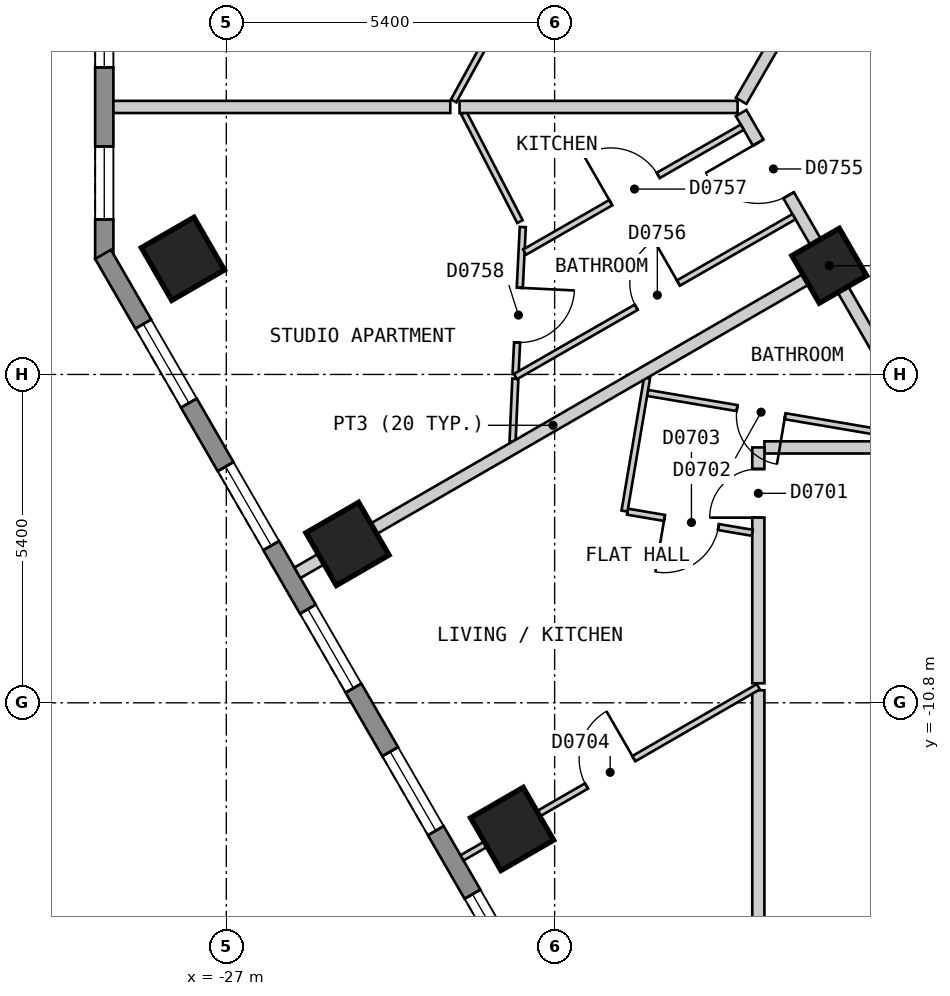
"""IFC4 building model, lengths in metres.
Left out: names, types, materials, properties, quantities, classifications, styles, units other than length and angle.
Written with IfcOpenShell. Run it as: python <this file> out.ifc"""

import sys

from ifc_helpers import new_model, si_unit, direction, frame, frame_2d, origin, origin_2d, place, context, subcontext, project, spatial, polyline, rectangle, outline, extrude, element, fill, save


model = new_model("IFC4")
c1 = context("Model", 3, precision=1e-05, world=origin(), true_north=direction((0.0, 1.0)))
c2 = subcontext(c1, "Body", "Model", "MODEL_VIEW")
j1 = project(units=[si_unit("LENGTHUNIT", "METRE"), si_unit("PLANEANGLEUNIT", "RADIAN")], contexts=[c1])
p1 = place(None, origin())
s1 = spatial("IfcSite", under=j1, at=p1, CompositionType="ELEMENT")
p2 = place(p1, origin())
s2 = spatial("IfcBuilding", under=s1, at=p2, CompositionType="ELEMENT")
p3 = place(p2, frame((0.0, 0.0, 105.0)))
s3 = spatial("IfcBuildingStorey", under=s2, at=p3, CompositionType="ELEMENT", Elevation=105.0)
for number, where, z_axis, x_axis in (
    (1, (-27.714, -3.499, 0.0), (0.0, 0.0, 1.0), (0.5, -0.866, 0.0)),
    (2, (-25.007, -8.187, 0.0), (0.0, 0.0, 1.0), (0.5, -0.866, 0.0)),
    (3, (-22.3, -12.875, 0.0), (0.0, 0.0, 1.0), (0.5, -0.866, 0.0)),
):
    element("IfcColumn", number, at=place(p3, frame(where, z_axis=z_axis, x_axis=x_axis)), inside=s3, PredefinedType="COLUMN", context=c2, shape_type="SweptSolid", body=[
        extrude(rectangle(XDim=1.0, YDim=1.0, at=origin_2d()), origin(), (0.0, 0.0, 1.0), 3.0),
    ])
p4 = place(p3, frame((-17.083, -3.612, 0.0), z_axis=(0.0, 0.0, 1.0), x_axis=(0.5, -0.866025403784, 0.0)))
e4 = element("IfcColumn", 4, at=p4, inside=s3, PredefinedType="COLUMN", context=c2, shape_type="SweptSolid", body=[
    extrude(rectangle(XDim=0.9, YDim=0.9, at=origin_2d()), origin(), (0.0, 0.0, 1.0), 3.0),
])
p5 = place(p3, frame((-29.007, 1.5, 0.0), z_axis=(0.0, 0.0, 1.0), x_axis=(0.0, -1.0, 0.0)))
e5 = element("IfcWall", 5, at=p5, inside=s3, PredefinedType="SOLIDWALL", context=c2, shape_type="SweptSolid", body=[
    extrude(outline(polyline([(0.0, -0.15), (5.0, -0.15), (4.92, 0.15), (0.08, 0.15), (0.0, -0.15)])), origin(), (0.0, 0.0, 1.0), 2.6),
])
p6 = place(p5, frame((0.65, 0.0, 0.15)))
e6 = element("IfcOpeningElement", 6, at=p6, cuts=e5, PredefinedType="OPENING", context=c2, shape_type="SweptSolid", body=[
    extrude(rectangle(XDim=1.2, YDim=2.1, at=frame_2d((0.6, 1.05))), frame((0.0, 0.16, 0.0), z_axis=(0.0, -1.0, 0.0), x_axis=(1.0, 0.0, 0.0)), (0.0, 0.0, 1.0), 0.32),
])
p7 = place(p5, frame((3.15, 0.0, 0.15)))
e7 = element("IfcOpeningElement", 7, at=p7, cuts=e5, PredefinedType="OPENING", context=c2, shape_type="SweptSolid", body=[
    extrude(rectangle(XDim=1.2, YDim=2.1, at=frame_2d((0.6, 1.05))), frame((0.0, 0.16, 0.0), z_axis=(0.0, -1.0, 0.0), x_axis=(1.0, 0.0, 0.0)), (0.0, 0.0, 1.0), 0.32),
])
p8 = place(p3, frame((-29.027, -3.425, 0.0), z_axis=(0.0, 0.0, 1.0), x_axis=(0.500035407905, -0.866004960056, 0.0)))
e8 = element("IfcWall", 8, at=p8, inside=s3, PredefinedType="SOLIDWALL", context=c2, shape_type="SweptSolid", body=[
    extrude(outline(polyline([(0.0, -0.15), (23.094, -0.15), (23.014, 0.15), (0.08, 0.15), (0.0, -0.15)])), origin(), (0.0, 0.0, 1.0), 2.6),
])
p9 = place(p8, frame((1.324, 0.0, 0.15)))
e9 = element("IfcOpeningElement", 9, at=p9, cuts=e8, PredefinedType="OPENING", context=c2, shape_type="SweptSolid", body=[
    extrude(rectangle(XDim=1.5, YDim=2.1, at=frame_2d((0.75, 1.05))), frame((0.0, 0.16, 0.0), z_axis=(0.0, -1.0, 0.0), x_axis=(1.0, 0.0, 0.0)), (0.0, 0.0, 1.0), 0.32),
])
p10 = place(p8, frame((4.031, 0.0, 0.15)))
e10 = element("IfcOpeningElement", 10, at=p10, cuts=e8, PredefinedType="OPENING", context=c2, shape_type="SweptSolid", body=[
    extrude(rectangle(XDim=1.5, YDim=2.1, at=frame_2d((0.75, 1.05))), frame((0.0, 0.16, 0.0), z_axis=(0.0, -1.0, 0.0), x_axis=(1.0, 0.0, 0.0)), (0.0, 0.0, 1.0), 0.32),
])
p11 = place(p8, frame((6.737, 0.0, 0.15)))
e11 = element("IfcOpeningElement", 11, at=p11, cuts=e8, PredefinedType="OPENING", context=c2, shape_type="SweptSolid", body=[
    extrude(rectangle(XDim=1.5, YDim=2.1, at=frame_2d((0.75, 1.05))), frame((0.0, 0.16, 0.0), z_axis=(0.0, -1.0, 0.0), x_axis=(1.0, 0.0, 0.0)), (0.0, 0.0, 1.0), 0.32),
])
p12 = place(p8, frame((9.444, 0.0, 0.15)))
e12 = element("IfcOpeningElement", 12, at=p12, cuts=e8, PredefinedType="OPENING", context=c2, shape_type="SweptSolid", body=[
    extrude(rectangle(XDim=1.5, YDim=2.1, at=frame_2d((0.75, 1.05))), frame((0.0, 0.16, 0.0), z_axis=(0.0, -1.0, 0.0), x_axis=(1.0, 0.0, 0.0)), (0.0, 0.0, 1.0), 0.32),
])
p13 = place(p8, frame((12.151, 0.0, 0.15)))
e13 = element("IfcOpeningElement", 13, at=p13, cuts=e8, PredefinedType="OPENING", context=c2, shape_type="SweptSolid", body=[
    extrude(rectangle(XDim=1.5, YDim=2.1, at=frame_2d((0.75, 1.05))), frame((0.0, 0.16, 0.0), z_axis=(0.0, -1.0, 0.0), x_axis=(1.0, 0.0, 0.0)), (0.0, 0.0, 1.0), 0.32),
])
p14 = place(p8, frame((14.857, 0.0, 0.15)))
e14 = element("IfcOpeningElement", 14, at=p14, cuts=e8, PredefinedType="OPENING", context=c2, shape_type="SweptSolid", body=[
    extrude(rectangle(XDim=1.5, YDim=2.1, at=frame_2d((0.75, 1.05))), frame((0.0, 0.16, 0.0), z_axis=(0.0, -1.0, 0.0), x_axis=(1.0, 0.0, 0.0)), (0.0, 0.0, 1.0), 0.32),
])
p15 = place(p8, frame((17.564, 0.0, 0.15)))
e15 = element("IfcOpeningElement", 15, at=p15, cuts=e8, PredefinedType="OPENING", context=c2, shape_type="SweptSolid", body=[
    extrude(rectangle(XDim=1.5, YDim=2.1, at=frame_2d((0.75, 1.05))), frame((0.0, 0.16, 0.0), z_axis=(0.0, -1.0, 0.0), x_axis=(1.0, 0.0, 0.0)), (0.0, 0.0, 1.0), 0.32),
])
p16 = place(p8, frame((20.27, 0.0, 0.15)))
e16 = element("IfcOpeningElement", 16, at=p16, cuts=e8, PredefinedType="OPENING", context=c2, shape_type="SweptSolid", body=[
    extrude(rectangle(XDim=1.5, YDim=2.1, at=frame_2d((0.75, 1.05))), frame((0.0, 0.16, 0.0), z_axis=(0.0, -1.0, 0.0), x_axis=(1.0, 0.0, 0.0)), (0.0, 0.0, 1.0), 0.32),
])
p17 = place(p3, frame((-18.533, -1.101, 0.0), z_axis=(0.0, 0.0, 1.0), x_axis=(0.500135180047, -0.865947343479, 0.0)))
e17 = element("IfcWall", 17, at=p17, inside=s3, PredefinedType="PARTITIONING", context=c2, shape_type="SweptSolid", body=[
    extrude(rectangle(XDim=2.799, YDim=0.2, at=frame_2d((1.399, 0.0))), origin(), (0.0, 0.0, 1.0), 2.6),
])
p18 = place(p17, frame((0.562, 0.0, 0.0)))
e18 = element("IfcOpeningElement", 18, at=p18, cuts=e17, PredefinedType="OPENING", context=c2, shape_type="SweptSolid", body=[
    extrude(rectangle(XDim=1.0, YDim=2.1, at=frame_2d((0.5, 1.05))), frame((0.0, 0.11, 0.0), z_axis=(0.0, -1.0, 0.0), x_axis=(1.0, 0.0, 0.0)), (0.0, 0.0, 1.0), 0.22),
])
p19 = place(p3, frame((-16.855, -4.008, 0.0), z_axis=(0.0, 0.0, 1.0), x_axis=(0.500151474942, -0.865937932021, 0.0)))
e19 = element("IfcWall", 19, at=p19, inside=s3, PredefinedType="PARTITIONING", context=c2, shape_type="SweptSolid", body=[
    extrude(rectangle(XDim=2.709, YDim=0.2, at=frame_2d((1.354, 0.0))), origin(), (0.0, 0.0, 1.0), 2.6),
])
p20 = place(p3, frame((-18.25, -10.594, 0.0), z_axis=(0.0, 0.0, 1.0), x_axis=(0.0, -1.0, 0.0)))
e20 = element("IfcWall", 20, at=p20, inside=s3, PredefinedType="PARTITIONING", context=c2, shape_type="SweptSolid", body=[
    extrude(rectangle(XDim=5.705, YDim=0.2, at=frame_2d((2.853, 0.0))), origin(), (0.0, 0.0, 1.0), 2.6),
])
p21 = place(p3, frame((-18.15, -6.6, 0.0), z_axis=(0.0, 0.0, 1.0), x_axis=(1.0, 0.0, 0.0)))
e21 = element("IfcWall", 21, at=p21, inside=s3, PredefinedType="PARTITIONING", context=c2, shape_type="SweptSolid", body=[
    extrude(rectangle(XDim=2.649, YDim=0.2, at=frame_2d((1.324, 0.0))), origin(), (0.0, 0.0, 1.0), 2.6),
])
p22 = place(p3, frame((-18.533, -0.901, 0.0), z_axis=(0.0, 0.0, 1.0), x_axis=(0.499981198768, 0.866036258409, 0.0)))
e22 = element("IfcWall", 22, at=p22, inside=s3, PredefinedType="PARTITIONING", context=c2, shape_type="SweptSolid", body=[
    extrude(rectangle(XDim=20.093, YDim=0.2, at=frame_2d((10.046, 0.0))), origin(), (0.0, 0.0, 1.0), 2.6),
])
p23 = place(p22, frame((14.57, 0.0, 0.0)))
e23 = element("IfcOpeningElement", 23, at=p23, cuts=e22, PredefinedType="OPENING", context=c2, shape_type="SweptSolid", body=[
    extrude(rectangle(XDim=1.0, YDim=2.1, at=frame_2d((0.5, 1.05))), frame((0.0, 0.11, 0.0), z_axis=(0.0, -1.0, 0.0), x_axis=(1.0, 0.0, 0.0)), (0.0, 0.0, 1.0), 0.22),
])
p24 = place(p22, frame((4.523, 0.0, 0.0)))
e24 = element("IfcOpeningElement", 24, at=p24, cuts=e22, PredefinedType="OPENING", context=c2, shape_type="SweptSolid", body=[
    extrude(rectangle(XDim=1.0, YDim=2.1, at=frame_2d((0.5, 1.05))), frame((0.0, 0.11, 0.0), z_axis=(0.0, -1.0, 0.0), x_axis=(1.0, 0.0, 0.0)), (0.0, 0.0, 1.0), 0.22),
])
p25 = place(p3, frame((-18.25, -10.479, 0.0), z_axis=(0.0, 0.0, 1.0), x_axis=(0.0, 1.0, 0.0)))
e25 = element("IfcWall", 25, at=p25, inside=s3, PredefinedType="PARTITIONING", context=c2, shape_type="SweptSolid", body=[
    extrude(rectangle(XDim=3.879, YDim=0.2, at=frame_2d((1.939, 0.0))), origin(), (0.0, 0.0, 1.0), 2.6),
])
p26 = place(p25, frame((2.724, 0.0, 0.0)))
e26 = element("IfcOpeningElement", 26, at=p26, cuts=e25, PredefinedType="OPENING", context=c2, shape_type="SweptSolid", body=[
    extrude(rectangle(XDim=0.8, YDim=2.1, at=frame_2d((0.4, 1.05))), frame((0.0, 0.11, 0.0), z_axis=(0.0, -1.0, 0.0), x_axis=(1.0, 0.0, 0.0)), (0.0, 0.0, 1.0), 0.22),
])
p27 = place(p3, frame((-23.093, -1.101, 0.0), z_axis=(0.0, 0.0, 1.0), x_axis=(0.459171814268, -0.888347479865, 0.0)))
e27 = element("IfcWall", 27, at=p27, inside=s3, PredefinedType="PARTITIONING", context=c2, shape_type="SweptSolid", body=[
    extrude(rectangle(XDim=2.01, YDim=0.1, at=frame_2d((1.005, 0.0))), origin(), (0.0, 0.0, 1.0), 2.6),
])
p28 = place(p3, frame((-20.071, -5.704, 0.0), z_axis=(0.0, 0.0, 1.0), x_axis=(0.985933263306, -0.16713946364, 0.0)))
e28 = element("IfcWall", 28, at=p28, inside=s3, PredefinedType="PARTITIONING", context=c2, shape_type="SweptSolid", body=[
    extrude(rectangle(XDim=4.636, YDim=0.1, at=frame_2d((2.318, 0.0))), origin(), (0.0, 0.0, 1.0), 2.6),
])
p29 = place(p28, frame((1.493, 0.0, 0.0)))
e29 = element("IfcOpeningElement", 29, at=p29, cuts=e28, PredefinedType="OPENING", context=c2, shape_type="SweptSolid", body=[
    extrude(rectangle(XDim=0.8, YDim=2.1, at=frame_2d((0.4, 1.05))), frame((0.0, 0.06, 0.0), z_axis=(0.0, -1.0, 0.0), x_axis=(1.0, 0.0, 0.0)), (0.0, 0.0, 1.0), 0.12),
])
p30 = place(p3, frame((-20.401, -7.657, 0.0), z_axis=(0.0, 0.0, 1.0), x_axis=(0.985991281902, -0.166796858522, 0.0)))
e30 = element("IfcWall", 30, at=p30, inside=s3, PredefinedType="PARTITIONING", context=c2, shape_type="SweptSolid", body=[
    extrude(rectangle(XDim=2.08, YDim=0.1, at=frame_2d((1.04, 0.0))), origin(), (0.0, 0.0, 1.0), 2.6),
])
p31 = place(p30, frame((0.616, 0.0, 0.0)))
e31 = element("IfcOpeningElement", 31, at=p31, cuts=e30, PredefinedType="OPENING", context=c2, shape_type="SweptSolid", body=[
    extrude(rectangle(XDim=0.9, YDim=2.1, at=frame_2d((0.45, 1.05))), frame((0.0, 0.06, 0.0), z_axis=(0.0, -1.0, 0.0), x_axis=(1.0, 0.0, 0.0)), (0.0, 0.0, 1.0), 0.12),
])
p32 = place(p3, frame((-23.261, -0.901, 0.0), z_axis=(0.0, 0.0, 1.0), x_axis=(0.481037050261, 0.876700265927, 0.0)))
e32 = element("IfcWall", 32, at=p32, inside=s3, PredefinedType="PARTITIONING", context=c2, shape_type="SweptSolid", body=[
    extrude(rectangle(XDim=4.827, YDim=0.1, at=frame_2d((2.414, 0.0))), origin(), (0.0, 0.0, 1.0), 2.6),
])
p33 = place(p3, frame((-20.451, -7.647, 0.0), z_axis=(0.0, 0.0, 1.0), x_axis=(0.167037570483, 0.985950531237, 0.0)))
e33 = element("IfcWall", 33, at=p33, inside=s3, PredefinedType="PARTITIONING", context=c2, shape_type="SweptSolid", body=[
    extrude(rectangle(XDim=2.22, YDim=0.1, at=frame_2d((1.11, 0.0))), origin(), (0.0, 0.0, 1.0), 2.6),
])
p34 = place(p3, frame((-22.243, -5.395, 0.0), z_axis=(0.0, 0.0, 1.0), x_axis=(0.049092933256, 0.998794214993, 0.0)))
e34 = element("IfcWall", 34, at=p34, inside=s3, PredefinedType="PARTITIONING", context=c2, shape_type="SweptSolid", body=[
    extrude(rectangle(XDim=2.422, YDim=0.1, at=frame_2d((1.211, 0.0))), origin(), (0.0, 0.0, 1.0), 2.6),
])
p35 = place(p34, frame((0.522, 0.0, 0.0)))
e35 = element("IfcOpeningElement", 35, at=p35, cuts=e34, PredefinedType="OPENING", context=c2, shape_type="SweptSolid", body=[
    extrude(rectangle(XDim=0.9, YDim=2.1, at=frame_2d((0.45, 1.05))), frame((0.0, 0.06, 0.0), z_axis=(0.0, -1.0, 0.0), x_axis=(1.0, 0.0, 0.0)), (0.0, 0.0, 1.0), 0.12),
])
p36 = place(p3, frame((-22.292, -6.504, 0.0), z_axis=(0.0, 0.0, 1.0), x_axis=(0.04434829575, 0.999016130332, 0.0)))
e36 = element("IfcWall", 36, at=p36, inside=s3, PredefinedType="PARTITIONING", context=c2, shape_type="SweptSolid", body=[
    extrude(rectangle(XDim=1.035, YDim=0.1, at=frame_2d((0.518, 0.0))), origin(), (0.0, 0.0, 1.0), 2.6),
])
p37 = place(p3, frame((-23.123, -13.35, 0.0), z_axis=(0.0, 0.0, 1.0), x_axis=(0.86596737403, 0.500100497016, 0.0)))
e37 = element("IfcWall", 37, at=p37, inside=s3, PredefinedType="PARTITIONING", context=c2, shape_type="SweptSolid", body=[
    extrude(rectangle(XDim=5.627, YDim=0.1, at=frame_2d((2.813, 0.0))), origin(), (0.0, 0.0, 1.0), 2.6),
])
p38 = place(p37, frame((2.363, 0.0, 0.0)))
e38 = element("IfcOpeningElement", 38, at=p38, cuts=e37, PredefinedType="OPENING", context=c2, shape_type="SweptSolid", body=[
    extrude(rectangle(XDim=0.9, YDim=2.1, at=frame_2d((0.45, 1.05))), frame((0.0, 0.06, 0.0), z_axis=(0.0, -1.0, 0.0), x_axis=(1.0, 0.0, 0.0)), (0.0, 0.0, 1.0), 0.12),
])
p39 = place(p3, frame((-22.245, -5.435, 0.0), z_axis=(0.0, 0.0, 1.0), x_axis=(0.867311485465, 0.497765795511, 0.0)))
e39 = element("IfcWall", 39, at=p39, inside=s3, PredefinedType="PARTITIONING", context=c2, shape_type="SweptSolid", body=[
    extrude(rectangle(XDim=5.282, YDim=0.1, at=frame_2d((2.641, 0.0))), origin(), (0.0, 0.0, 1.0), 2.6),
])
p40 = place(p39, frame((2.291, 0.0, 0.0)))
e40 = element("IfcOpeningElement", 40, at=p40, cuts=e39, PredefinedType="OPENING", context=c2, shape_type="SweptSolid", body=[
    extrude(rectangle(XDim=0.8, YDim=2.1, at=frame_2d((0.4, 1.05))), frame((0.0, 0.06, 0.0), z_axis=(0.0, -1.0, 0.0), x_axis=(1.0, 0.0, 0.0)), (0.0, 0.0, 1.0), 0.12),
])
p41 = place(p3, frame((-22.094, -3.388, 0.0), z_axis=(0.0, 0.0, 1.0), x_axis=(0.867386440944, 0.497635169644, 0.0)))
e41 = element("IfcWall", 41, at=p41, inside=s3, PredefinedType="PARTITIONING", context=c2, shape_type="SweptSolid", body=[
    extrude(rectangle(XDim=4.127, YDim=0.1, at=frame_2d((2.064, 0.0))), origin(), (0.0, 0.0, 1.0), 2.6),
])
p42 = place(p41, frame((1.634, 0.0, 0.0)))
e42 = element("IfcOpeningElement", 42, at=p42, cuts=e41, PredefinedType="OPENING", context=c2, shape_type="SweptSolid", body=[
    extrude(rectangle(XDim=0.9, YDim=2.1, at=frame_2d((0.45, 1.05))), frame((0.0, 0.06, 0.0), z_axis=(0.0, -1.0, 0.0), x_axis=(1.0, 0.0, 0.0)), (0.0, 0.0, 1.0), 0.12),
])
p43 = place(p3, frame((-17.224, -3.844, 0.0), z_axis=(0.0, 0.0, 1.0), x_axis=(0.986049492372, -0.166452391373, 0.0)))
e43 = element("IfcWall", 43, at=p43, inside=s3, PredefinedType="PARTITIONING", context=c2, shape_type="SweptSolid", body=[
    extrude(rectangle(XDim=0.27, YDim=0.2, at=frame_2d((0.135, 0.0))), origin(), (0.0, 0.0, 1.0), 2.6),
])
p44 = place(p3, frame((-28.857, -1.001, 0.0), z_axis=(0.0, 0.0, 1.0), x_axis=(1.0, 0.0, 0.0)))
e44 = element("IfcWall", 44, at=p44, inside=s3, PredefinedType="PARTITIONING", context=c2, shape_type="SweptSolid", body=[
    extrude(rectangle(XDim=5.541, YDim=0.2, at=frame_2d((2.771, 0.0))), origin(), (0.0, 0.0, 1.0), 2.6),
])
p45 = place(p3, frame((-23.164, -1.001, 0.0), z_axis=(0.0, 0.0, 1.0), x_axis=(1.0, 0.0, 0.0)))
e45 = element("IfcWall", 45, at=p45, inside=s3, PredefinedType="PARTITIONING", context=c2, shape_type="SweptSolid", body=[
    extrude(rectangle(XDim=4.573, YDim=0.2, at=frame_2d((2.287, 0.0))), origin(), (0.0, 0.0, 1.0), 2.6),
])
p46 = place(p3, frame((-25.83, -8.662, 0.0), z_axis=(0.0, 0.0, 1.0), x_axis=(0.866026801646, 0.499997578825, 0.0)))
e46 = element("IfcWall", 46, at=p46, inside=s3, PredefinedType="PARTITIONING", context=c2, shape_type="SweptSolid", body=[
    extrude(rectangle(XDim=9.704, YDim=0.2, at=frame_2d((4.852, 0.0))), origin(), (0.0, 0.0, 1.0), 2.6),
])
p47 = place(p3, frame((-17.385, -3.786, 0.0), z_axis=(0.0, 0.0, 1.0), x_axis=(0.86668269741, 0.498859801958, 0.0)))
e47 = element("IfcWall", 47, at=p47, inside=s3, PredefinedType="PARTITIONING", context=c2, shape_type="SweptSolid", body=[
    extrude(rectangle(XDim=0.319, YDim=0.2, at=frame_2d((0.159, 0.0))), origin(), (0.0, 0.0, 1.0), 2.6),
])
p48 = place(p6, origin())
e48 = element("IfcWindow", 48, at=p48, inside=s3, PartitioningType="SINGLE_PANEL", PredefinedType="WINDOW", context=c2, shape_type="SweptSolid", body=[
    extrude(rectangle(XDim=1.2, YDim=2.1, at=frame_2d((0.6, 1.05))), frame((0.0, 0.03, 0.0), z_axis=(0.0, -1.0, 0.0), x_axis=(1.0, 0.0, 0.0)), (0.0, 0.0, 1.0), 0.06),
])
fill(e6, e48)
p49 = place(p7, origin())
e49 = element("IfcWindow", 49, at=p49, inside=s3, PartitioningType="SINGLE_PANEL", PredefinedType="WINDOW", context=c2, shape_type="SweptSolid", body=[
    extrude(rectangle(XDim=1.2, YDim=2.1, at=frame_2d((0.6, 1.05))), frame((0.0, 0.03, 0.0), z_axis=(0.0, -1.0, 0.0), x_axis=(1.0, 0.0, 0.0)), (0.0, 0.0, 1.0), 0.06),
])
fill(e7, e49)
p50 = place(p9, origin())
e50 = element("IfcWindow", 50, at=p50, inside=s3, PartitioningType="SINGLE_PANEL", PredefinedType="WINDOW", context=c2, shape_type="SweptSolid", body=[
    extrude(rectangle(XDim=1.5, YDim=2.1, at=frame_2d((0.75, 1.05))), frame((0.0, 0.03, 0.0), z_axis=(0.0, -1.0, 0.0), x_axis=(1.0, 0.0, 0.0)), (0.0, 0.0, 1.0), 0.06),
])
fill(e9, e50)
p51 = place(p10, origin())
e51 = element("IfcWindow", 51, at=p51, inside=s3, PartitioningType="SINGLE_PANEL", PredefinedType="WINDOW", context=c2, shape_type="SweptSolid", body=[
    extrude(rectangle(XDim=1.5, YDim=2.1, at=frame_2d((0.75, 1.05))), frame((0.0, 0.03, 0.0), z_axis=(0.0, -1.0, 0.0), x_axis=(1.0, 0.0, 0.0)), (0.0, 0.0, 1.0), 0.06),
])
fill(e10, e51)
p52 = place(p11, origin())
e52 = element("IfcWindow", 52, at=p52, inside=s3, PartitioningType="SINGLE_PANEL", PredefinedType="WINDOW", context=c2, shape_type="SweptSolid", body=[
    extrude(rectangle(XDim=1.5, YDim=2.1, at=frame_2d((0.75, 1.05))), frame((0.0, 0.03, 0.0), z_axis=(0.0, -1.0, 0.0), x_axis=(1.0, 0.0, 0.0)), (0.0, 0.0, 1.0), 0.06),
])
fill(e11, e52)
p53 = place(p12, origin())
e53 = element("IfcWindow", 53, at=p53, inside=s3, PartitioningType="SINGLE_PANEL", PredefinedType="WINDOW", context=c2, shape_type="SweptSolid", body=[
    extrude(rectangle(XDim=1.5, YDim=2.1, at=frame_2d((0.75, 1.05))), frame((0.0, 0.03, 0.0), z_axis=(0.0, -1.0, 0.0), x_axis=(1.0, 0.0, 0.0)), (0.0, 0.0, 1.0), 0.06),
])
fill(e12, e53)
p54 = place(p13, origin())
e54 = element("IfcWindow", 54, at=p54, inside=s3, PartitioningType="SINGLE_PANEL", PredefinedType="WINDOW", context=c2, shape_type="SweptSolid", body=[
    extrude(rectangle(XDim=1.5, YDim=2.1, at=frame_2d((0.75, 1.05))), frame((0.0, 0.03, 0.0), z_axis=(0.0, -1.0, 0.0), x_axis=(1.0, 0.0, 0.0)), (0.0, 0.0, 1.0), 0.06),
])
fill(e13, e54)
p55 = place(p26, origin())
e55 = element("IfcDoor", 55, at=p55, inside=s3, OperationType="SINGLE_SWING_LEFT", PredefinedType="DOOR", context=c2, shape_type="SweptSolid", body=[
    extrude(rectangle(XDim=0.8, YDim=2.1, at=frame_2d((0.4, 1.05))), frame((0.0, 0.025, 0.0), z_axis=(0.0, -1.0, 0.0), x_axis=(1.0, 0.0, 0.0)), (0.0, 0.0, 1.0), 0.05),
])
fill(e26, e55)
p56 = place(p29, origin())
e56 = element("IfcDoor", 56, at=p56, inside=s3, OperationType="SINGLE_SWING_RIGHT", PredefinedType="DOOR", context=c2, shape_type="SweptSolid", body=[
    extrude(rectangle(XDim=0.8, YDim=2.1, at=frame_2d((0.4, 1.05))), frame((0.0, 0.025, 0.0), z_axis=(0.0, -1.0, 0.0), x_axis=(1.0, 0.0, 0.0)), (0.0, 0.0, 1.0), 0.05),
])
fill(e29, e56)
p57 = place(p31, origin())
e57 = element("IfcDoor", 57, at=p57, inside=s3, OperationType="SINGLE_SWING_LEFT", PredefinedType="DOOR", context=c2, shape_type="SweptSolid", body=[
    extrude(rectangle(XDim=0.9, YDim=2.1, at=frame_2d((0.45, 1.05))), frame((0.0, 0.025, 0.0), z_axis=(0.0, -1.0, 0.0), x_axis=(1.0, 0.0, 0.0)), (0.0, 0.0, 1.0), 0.05),
])
fill(e31, e57)
p58 = place(p38, origin())
e58 = element("IfcDoor", 58, at=p58, inside=s3, OperationType="SINGLE_SWING_RIGHT", PredefinedType="DOOR", context=c2, shape_type="SweptSolid", body=[
    extrude(rectangle(XDim=0.9, YDim=2.1, at=frame_2d((0.45, 1.05))), frame((0.0, 0.025, 0.0), z_axis=(0.0, -1.0, 0.0), x_axis=(1.0, 0.0, 0.0)), (0.0, 0.0, 1.0), 0.05),
])
fill(e38, e58)
p59 = place(p18, origin())
e59 = element("IfcDoor", 59, at=p59, inside=s3, OperationType="SINGLE_SWING_LEFT", PredefinedType="DOOR", context=c2, shape_type="SweptSolid", body=[
    extrude(rectangle(XDim=1.0, YDim=2.1, at=frame_2d((0.5, 1.05))), frame((0.0, 0.025, 0.0), z_axis=(0.0, -1.0, 0.0), x_axis=(1.0, 0.0, 0.0)), (0.0, 0.0, 1.0), 0.05),
])
fill(e18, e59)
p60 = place(p40, origin())
e60 = element("IfcDoor", 60, at=p60, inside=s3, OperationType="SINGLE_SWING_RIGHT", PredefinedType="DOOR", context=c2, shape_type="SweptSolid", body=[
    extrude(rectangle(XDim=0.8, YDim=2.1, at=frame_2d((0.4, 1.05))), frame((0.0, 0.025, 0.0), z_axis=(0.0, -1.0, 0.0), x_axis=(1.0, 0.0, 0.0)), (0.0, 0.0, 1.0), 0.05),
])
fill(e40, e60)
p61 = place(p42, origin())
e61 = element("IfcDoor", 61, at=p61, inside=s3, OperationType="SINGLE_SWING_LEFT", PredefinedType="DOOR", context=c2, shape_type="SweptSolid", body=[
    extrude(rectangle(XDim=0.9, YDim=2.1, at=frame_2d((0.45, 1.05))), frame((0.0, 0.025, 0.0), z_axis=(0.0, -1.0, 0.0), x_axis=(1.0, 0.0, 0.0)), (0.0, 0.0, 1.0), 0.05),
])
fill(e42, e61)
p62 = place(p35, origin())
e62 = element("IfcDoor", 62, at=p62, inside=s3, OperationType="SINGLE_SWING_RIGHT", PredefinedType="DOOR", context=c2, shape_type="SweptSolid", body=[
    extrude(rectangle(XDim=0.9, YDim=2.1, at=frame_2d((0.45, 1.05))), frame((0.0, 0.025, 0.0), z_axis=(0.0, -1.0, 0.0), x_axis=(1.0, 0.0, 0.0)), (0.0, 0.0, 1.0), 0.05),
])
fill(e35, e62)
save(model, sys.argv[1])
